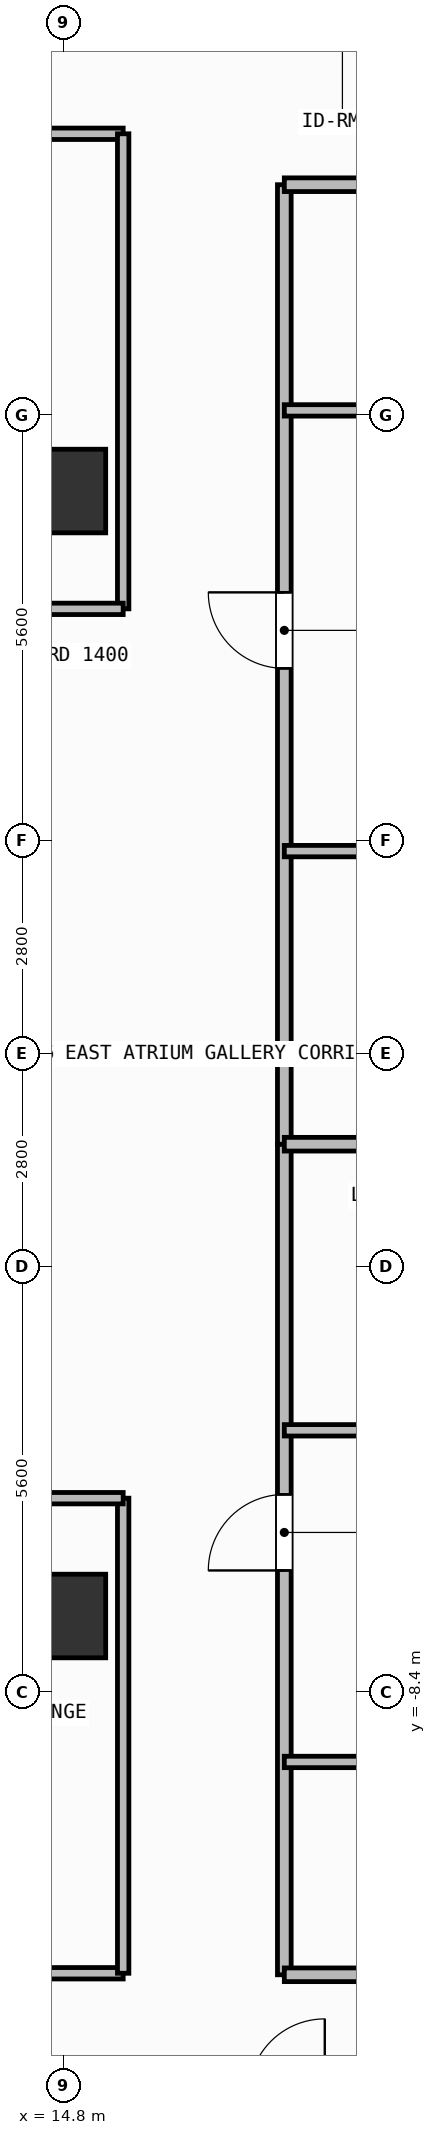
"""IFC4 building model, lengths in metres.
Left out: names, types, materials, properties, quantities, classifications, styles, units other than length and angle.
Written with IfcOpenShell. Run it as: python <this file> out.ifc"""

import sys

from ifc_helpers import new_model, si_unit, direction, frame, frame_2d, origin, origin_2d, place, context, subcontext, project, spatial, rectangle, extrude, element, fill, save


model = new_model("IFC4")
c1 = context("Model", 3, precision=1e-05, world=origin(), true_north=direction((0.0, 1.0)))
c2 = subcontext(c1, "Body", "Model", "MODEL_VIEW")
j1 = project(units=[si_unit("LENGTHUNIT", "METRE"), si_unit("PLANEANGLEUNIT", "RADIAN")], contexts=[c1])
p1 = place(None, origin())
s1 = spatial("IfcSite", under=j1, at=p1, CompositionType="ELEMENT")
p2 = place(p1, origin())
s2 = spatial("IfcBuilding", under=s1, at=p2, CompositionType="ELEMENT")
p3 = place(p2, frame((0.0, 0.0, 227.4)))
s3 = spatial("IfcBuildingStorey", under=s2, at=p3, CompositionType="ELEMENT", Elevation=227.4)
for number, where, z_axis, x_axis in (
    (1, (14.8, -7.4, 0.0), (0.0, 0.0, 1.0), (1.0, 0.0, 0.0)),
    (2, (14.8, 7.4, 0.0), (0.0, 0.0, 1.0), (1.0, 0.0, 0.0)),
):
    element("IfcColumn", number, at=place(p3, frame(where, z_axis=z_axis, x_axis=x_axis)), inside=s3, PredefinedType="COLUMN", context=c2, shape_type="SweptSolid", body=[
        extrude(rectangle(XDim=1.1, YDim=1.1, at=origin_2d()), origin(), (0.0, 0.0, 1.0), 3.9),
    ])
p4 = place(p3, frame((10.1, -12.1, 0.0), z_axis=(0.0, 0.0, 1.0), x_axis=(1.0, 0.0, 0.0)))
e3 = element("IfcWall", 3, at=p4, inside=s3, PredefinedType="PARTITIONING", context=c2, shape_type="SweptSolid", body=[
    extrude(rectangle(XDim=5.48, YDim=0.15, at=frame_2d((2.74, 0.0))), origin(), (0.0, 0.0, 1.0), 3.68),
])
p5 = place(p4, frame((2.29, 0.0, 0.0)))
e4 = element("IfcOpeningElement", 4, at=p5, cuts=e3, PredefinedType="OPENING", context=c2, shape_type="SweptSolid", body=[
    extrude(rectangle(XDim=0.9, YDim=2.1, at=frame_2d((0.45, 1.05))), frame((0.0, 0.085, 0.0), z_axis=(0.0, -1.0, 0.0), x_axis=(1.0, 0.0, 0.0)), (0.0, 0.0, 1.0), 0.17),
])
p6 = place(p3, frame((8.36, 12.1, 0.0), z_axis=(0.0, 0.0, 1.0), x_axis=(1.0, 0.0, 0.0)))
e5 = element("IfcWall", 5, at=p6, inside=s3, PredefinedType="PARTITIONING", context=c2, shape_type="SweptSolid", body=[
    extrude(rectangle(XDim=7.22, YDim=0.15, at=frame_2d((3.61, 0.0))), origin(), (0.0, 0.0, 1.0), 3.68),
])
p7 = place(p6, frame((3.513, 0.0, 0.0)))
e6 = element("IfcOpeningElement", 6, at=p7, cuts=e5, PredefinedType="OPENING", context=c2, shape_type="SweptSolid", body=[
    extrude(rectangle(XDim=0.9, YDim=2.1, at=frame_2d((0.45, 1.05))), frame((0.0, 0.085, 0.0), z_axis=(0.0, -1.0, 0.0), x_axis=(1.0, 0.0, 0.0)), (0.0, 0.0, 1.0), 0.17),
])
p8 = place(p3, frame((17.7, -12.12, 0.0), z_axis=(0.0, 0.0, 1.0), x_axis=(0.0, 1.0, 0.0)))
e7 = element("IfcWall", 7, at=p8, inside=s3, PredefinedType="PARTITIONING", context=c2, shape_type="SweptSolid", body=[
    extrude(rectangle(XDim=10.927, YDim=0.18, at=frame_2d((5.463, 0.0))), origin(), (0.0, 0.0, 1.0), 3.68),
])
p9 = place(p8, frame((5.319, 0.0, 0.0)))
e8 = element("IfcOpeningElement", 8, at=p9, cuts=e7, PredefinedType="OPENING", context=c2, shape_type="SweptSolid", body=[
    extrude(rectangle(XDim=1.0, YDim=2.2, at=frame_2d((0.5, 1.1))), frame((0.0, 0.1, 0.0), z_axis=(0.0, -1.0, 0.0), x_axis=(1.0, 0.0, 0.0)), (0.0, 0.0, 1.0), 0.2),
])
p10 = place(p3, frame((17.7, -4.957, 0.0), z_axis=(0.0, 0.0, 1.0), x_axis=(1.0, 0.0, 0.0)))
e9 = element("IfcWall", 9, at=p10, inside=s3, PredefinedType="PARTITIONING", context=c2, shape_type="SweptSolid", body=[
    extrude(rectangle(XDim=4.19, YDim=0.15, at=frame_2d((2.095, 0.0))), origin(), (0.0, 0.0, 1.0), 3.68),
])
p11 = place(p10, frame((1.581, 0.0, 0.0)))
e10 = element("IfcOpeningElement", 10, at=p11, cuts=e9, PredefinedType="OPENING", context=c2, shape_type="SweptSolid", body=[
    extrude(rectangle(XDim=0.85, YDim=2.1, at=frame_2d((0.425, 1.05))), frame((0.0, 0.085, 0.0), z_axis=(0.0, -1.0, 0.0), x_axis=(1.0, 0.0, 0.0)), (0.0, 0.0, 1.0), 0.17),
])
p12 = place(p3, frame((17.7, -9.32, 0.0), z_axis=(0.0, 0.0, 1.0), x_axis=(1.0, 0.0, 0.0)))
e11 = element("IfcWall", 11, at=p12, inside=s3, PredefinedType="PARTITIONING", context=c2, shape_type="SweptSolid", body=[
    extrude(rectangle(XDim=4.19, YDim=0.15, at=frame_2d((2.095, 0.0))), origin(), (0.0, 0.0, 1.0), 3.68),
])
p13 = place(p12, frame((1.581, 0.0, 0.0)))
e12 = element("IfcOpeningElement", 12, at=p13, cuts=e11, PredefinedType="OPENING", context=c2, shape_type="SweptSolid", body=[
    extrude(rectangle(XDim=0.85, YDim=2.1, at=frame_2d((0.425, 1.05))), frame((0.0, 0.085, 0.0), z_axis=(0.0, -1.0, 0.0), x_axis=(1.0, 0.0, 0.0)), (0.0, 0.0, 1.0), 0.17),
])
p14 = place(p3, frame((17.7, -1.193, 0.0), z_axis=(0.0, 0.0, 1.0), x_axis=(0.0, 1.0, 0.0)))
e13 = element("IfcWall", 13, at=p14, inside=s3, PredefinedType="PARTITIONING", context=c2, shape_type="SweptSolid", body=[
    extrude(rectangle(XDim=12.623, YDim=0.18, at=frame_2d((6.312, 0.0))), origin(), (0.0, 0.0, 1.0), 3.68),
])
p15 = place(p14, frame((6.26, 0.0, 0.0)))
e14 = element("IfcOpeningElement", 14, at=p15, cuts=e13, PredefinedType="OPENING", context=c2, shape_type="SweptSolid", body=[
    extrude(rectangle(XDim=1.0, YDim=2.2, at=frame_2d((0.5, 1.1))), frame((0.0, 0.1, 0.0), z_axis=(0.0, -1.0, 0.0), x_axis=(1.0, 0.0, 0.0)), (0.0, 0.0, 1.0), 0.2),
])
p16 = place(p3, frame((17.7, 8.461, 0.0), z_axis=(0.0, 0.0, 1.0), x_axis=(1.0, 0.0, 0.0)))
e15 = element("IfcWall", 15, at=p16, inside=s3, PredefinedType="PARTITIONING", context=c2, shape_type="SweptSolid", body=[
    extrude(rectangle(XDim=4.693, YDim=0.15, at=frame_2d((2.347, 0.0))), origin(), (0.0, 0.0, 1.0), 3.68),
])
p17 = place(p16, frame((2.274, 0.0, 0.0)))
e16 = element("IfcOpeningElement", 16, at=p17, cuts=e15, PredefinedType="OPENING", context=c2, shape_type="SweptSolid", body=[
    extrude(rectangle(XDim=0.85, YDim=2.1, at=frame_2d((0.425, 1.05))), frame((0.0, 0.085, 0.0), z_axis=(0.0, -1.0, 0.0), x_axis=(1.0, 0.0, 0.0)), (0.0, 0.0, 1.0), 0.17),
])
p18 = place(p3, frame((17.7, 2.663, 0.0), z_axis=(0.0, 0.0, 1.0), x_axis=(1.0, 0.0, 0.0)))
e17 = element("IfcWall", 17, at=p18, inside=s3, PredefinedType="PARTITIONING", context=c2, shape_type="SweptSolid", body=[
    extrude(rectangle(XDim=4.693, YDim=0.15, at=frame_2d((2.347, 0.0))), origin(), (0.0, 0.0, 1.0), 3.68),
])
p19 = place(p18, frame((1.921, 0.0, 0.0)))
e18 = element("IfcOpeningElement", 18, at=p19, cuts=e17, PredefinedType="OPENING", context=c2, shape_type="SweptSolid", body=[
    extrude(rectangle(XDim=0.85, YDim=2.1, at=frame_2d((0.425, 1.05))), frame((0.0, 0.085, 0.0), z_axis=(0.0, -1.0, 0.0), x_axis=(1.0, 0.0, 0.0)), (0.0, 0.0, 1.0), 0.17),
])
p20 = place(p3, frame((15.58, -12.1, 0.0), z_axis=(0.0, 0.0, 1.0), x_axis=(0.0, 1.0, 0.0)))
e19 = element("IfcWall", 19, at=p20, inside=s3, PredefinedType="PARTITIONING", context=c2, shape_type="SweptSolid", body=[
    extrude(rectangle(XDim=6.25, YDim=0.15, at=frame_2d((3.125, 0.0))), origin(), (0.0, 0.0, 1.0), 3.68),
])
p21 = place(p3, frame((8.96, -5.85, 0.0), z_axis=(0.0, 0.0, 1.0), x_axis=(1.0, 0.0, 0.0)))
e20 = element("IfcWall", 20, at=p21, inside=s3, PredefinedType="PARTITIONING", context=c2, shape_type="SweptSolid", body=[
    extrude(rectangle(XDim=6.62, YDim=0.15, at=frame_2d((3.31, 0.0))), origin(), (0.0, 0.0, 1.0), 3.68),
])
p22 = place(p3, frame((15.58, 5.85, 0.0), z_axis=(0.0, 0.0, 1.0), x_axis=(0.0, 1.0, 0.0)))
e21 = element("IfcWall", 21, at=p22, inside=s3, PredefinedType="PARTITIONING", context=c2, shape_type="SweptSolid", body=[
    extrude(rectangle(XDim=6.25, YDim=0.15, at=frame_2d((3.125, 0.0))), origin(), (0.0, 0.0, 1.0), 3.68),
])
p23 = place(p3, frame((8.96, 5.85, 0.0), z_axis=(0.0, 0.0, 1.0), x_axis=(1.0, 0.0, 0.0)))
e22 = element("IfcWall", 22, at=p23, inside=s3, PredefinedType="PARTITIONING", context=c2, shape_type="SweptSolid", body=[
    extrude(rectangle(XDim=6.62, YDim=0.15, at=frame_2d((3.31, 0.0))), origin(), (0.0, 0.0, 1.0), 3.68),
])
for number, where, z_axis, x_axis in (
    (23, (17.7, -1.193, 0.0), (0.0, 0.0, 1.0), (1.0, 0.0, 0.0)),
    (24, (17.7, -12.12, 0.0), (0.0, 0.0, 1.0), (1.0, 0.0, 0.0)),
):
    element("IfcWall", number, at=place(p3, frame(where, z_axis=z_axis, x_axis=x_axis)), inside=s3, PredefinedType="PARTITIONING", context=c2, shape_type="SweptSolid", body=[
        extrude(rectangle(XDim=8.43, YDim=0.18, at=frame_2d((4.215, 0.0))), origin(), (0.0, 0.0, 1.0), 3.68),
    ])
p24 = place(p3, frame((17.7, 11.43, 0.0), z_axis=(0.0, 0.0, 1.0), x_axis=(1.0, 0.0, 0.0)))
e25 = element("IfcWall", 25, at=p24, inside=s3, PredefinedType="PARTITIONING", context=c2, shape_type="SweptSolid", body=[
    extrude(rectangle(XDim=8.43, YDim=0.18, at=frame_2d((4.215, 0.0))), origin(), (0.0, 0.0, 1.0), 3.42),
])
p25 = place(p9, origin())
e26 = element("IfcDoor", 26, at=p25, inside=s3, OperationType="SINGLE_SWING_LEFT", PredefinedType="DOOR", context=c2, shape_type="SweptSolid", body=[
    extrude(rectangle(XDim=1.0, YDim=2.2, at=frame_2d((0.5, 1.1))), frame((0.0, 0.025, 0.0), z_axis=(0.0, -1.0, 0.0), x_axis=(1.0, 0.0, 0.0)), (0.0, 0.0, 1.0), 0.05),
])
fill(e8, e26)
p26 = place(p15, origin())
e27 = element("IfcDoor", 27, at=p26, inside=s3, OperationType="SINGLE_SWING_RIGHT", PredefinedType="DOOR", context=c2, shape_type="SweptSolid", body=[
    extrude(rectangle(XDim=1.0, YDim=2.2, at=frame_2d((0.5, 1.1))), frame((0.0, 0.025, 0.0), z_axis=(0.0, -1.0, 0.0), x_axis=(1.0, 0.0, 0.0)), (0.0, 0.0, 1.0), 0.05),
])
fill(e14, e27)
save(model, sys.argv[1])
